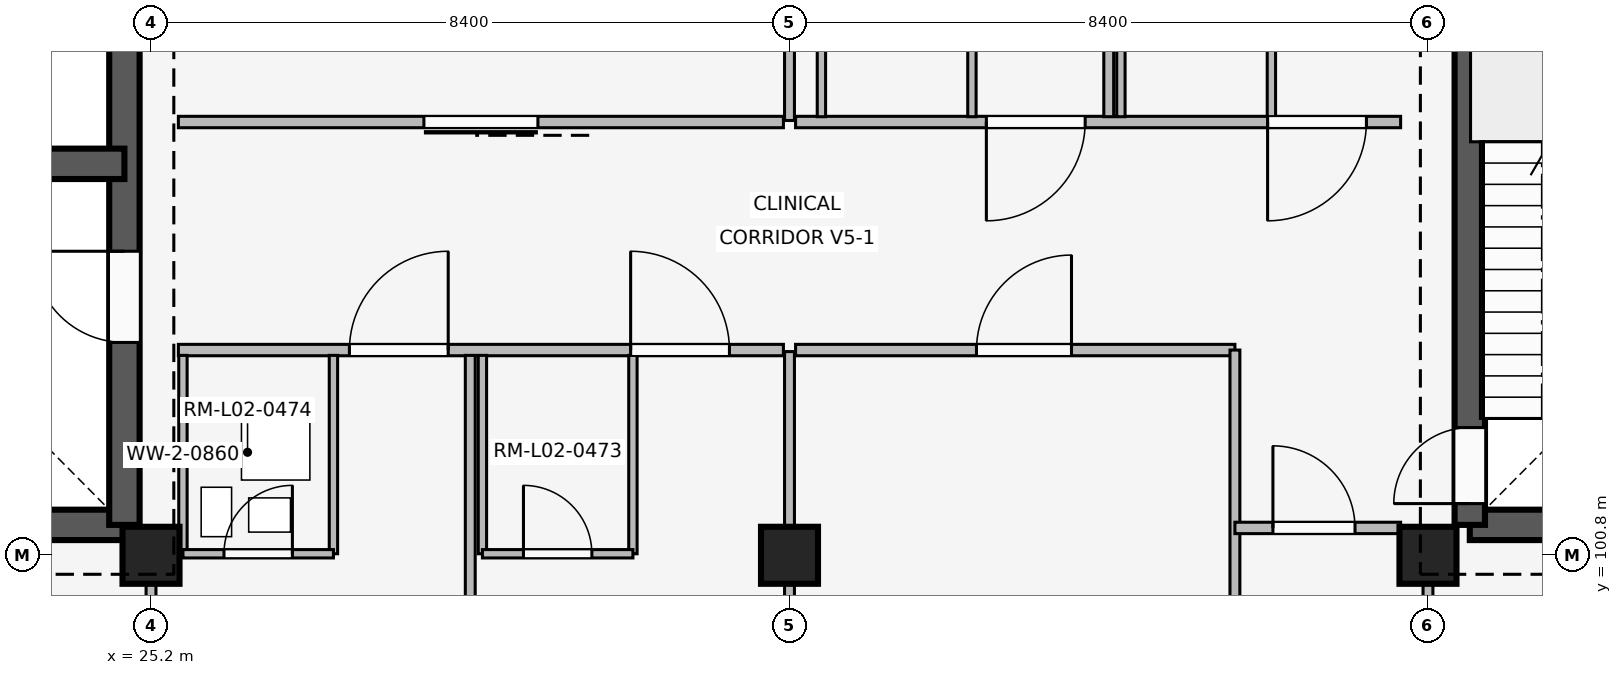
"""IFC4 building model, lengths in metres.
Left out: names, types, materials, properties, quantities, classifications, styles, units other than length and angle.
Written with IfcOpenShell. Run it as: python <this file> out.ifc"""

import sys

from ifc_helpers import new_model, si_unit, direction, frame, frame_2d, origin, origin_2d, place, context, subcontext, project, spatial, rectangle, extrude, element, fill, save


model = new_model("IFC4")
c1 = context("Model", 3, precision=1e-05, world=origin(), true_north=direction((0.0, 1.0)))
c2 = subcontext(c1, "Body", "Model", "MODEL_VIEW")
j1 = project(units=[si_unit("LENGTHUNIT", "METRE"), si_unit("PLANEANGLEUNIT", "RADIAN")], contexts=[c1])
p1 = place(None, origin())
s1 = spatial("IfcSite", under=j1, at=p1, CompositionType="ELEMENT")
p2 = place(p1, origin())
s2 = spatial("IfcBuilding", under=s1, at=p2, CompositionType="ELEMENT")
p3 = place(p2, frame((0.0, 0.0, 8.1)))
s3 = spatial("IfcBuildingStorey", under=s2, at=p3, CompositionType="ELEMENT", Elevation=8.1)
for number, where, z_axis, x_axis in (
    (1, (25.2, 100.8, 0.0), (0.0, 0.0, 1.0), (1.0, 0.0, 0.0)),
    (2, (33.6, 100.8, 0.0), (0.0, 0.0, 1.0), (1.0, 0.0, 0.0)),
    (3, (42.0, 100.8, 0.0), (0.0, 0.0, 1.0), (1.0, 0.0, 0.0)),
):
    element("IfcColumn", number, at=place(p3, frame(where, z_axis=z_axis, x_axis=x_axis)), inside=s3, PredefinedType="COLUMN", context=c2, shape_type="SweptSolid", body=[
        extrude(rectangle(XDim=0.75, YDim=0.75, at=origin_2d()), origin(), (0.0, 0.0, 1.0), 4.8),
    ])
p4 = place(p3, frame((42.55, 101.2, 0.0), z_axis=(0.0, 0.0, 1.0), x_axis=(1.0, 0.0, 0.0)))
e4 = element("IfcWall", 4, at=p4, inside=s3, PredefinedType="SHEAR", context=c2, shape_type="SweptSolid", body=[
    extrude(rectangle(XDim=7.5, YDim=0.4, at=frame_2d((3.75, 0.0))), origin(), (0.0, 0.0, 1.0), 4.52),
])
p5 = place(p4, frame((4.85, 0.0, 0.0)))
e5 = element("IfcOpeningElement", 5, at=p5, cuts=e4, PredefinedType="OPENING", context=c2, shape_type="SweptSolid", body=[
    extrude(rectangle(XDim=1.2, YDim=2.2, at=frame_2d((0.6, 1.1))), frame((0.0, 0.21, 0.0), z_axis=(0.0, -1.0, 0.0), x_axis=(1.0, 0.0, 0.0)), (0.0, 0.0, 1.0), 0.42),
])
p6 = place(p3, frame((42.55, 101.2, 0.0), z_axis=(0.0, 0.0, 1.0), x_axis=(0.0, 1.0, 0.0)))
e6 = element("IfcWall", 6, at=p6, inside=s3, PredefinedType="SHEAR", context=c2, shape_type="SweptSolid", body=[
    extrude(rectangle(XDim=7.55, YDim=0.4, at=frame_2d((3.775, 0.0))), origin(), (0.0, 0.0, 1.0), 4.52),
])
p7 = place(p6, frame((0.28, 0.0, 0.0)))
e7 = element("IfcOpeningElement", 7, at=p7, cuts=e6, PredefinedType="OPENING", context=c2, shape_type="SweptSolid", body=[
    extrude(rectangle(XDim=1.0, YDim=2.15, at=frame_2d((0.5, 1.075))), frame((0.0, 0.21, 0.0), z_axis=(0.0, -1.0, 0.0), x_axis=(1.0, 0.0, 0.0)), (0.0, 0.0, 1.0), 0.42),
])
p8 = place(p3, frame((17.35, 101.2, 0.0), z_axis=(0.0, 0.0, 1.0), x_axis=(1.0, 0.0, 0.0)))
e8 = element("IfcWall", 8, at=p8, inside=s3, PredefinedType="SHEAR", context=c2, shape_type="SweptSolid", body=[
    extrude(rectangle(XDim=7.5, YDim=0.4, at=frame_2d((3.75, 0.0))), origin(), (0.0, 0.0, 1.0), 4.52),
])
p9 = place(p8, frame((4.85, 0.0, 0.0)))
e9 = element("IfcOpeningElement", 9, at=p9, cuts=e8, PredefinedType="OPENING", context=c2, shape_type="SweptSolid", body=[
    extrude(rectangle(XDim=1.2, YDim=2.2, at=frame_2d((0.6, 1.1))), frame((0.0, 0.21, 0.0), z_axis=(0.0, -1.0, 0.0), x_axis=(1.0, 0.0, 0.0)), (0.0, 0.0, 1.0), 0.42),
])
p10 = place(p3, frame((24.85, 101.2, 0.0), z_axis=(0.0, 0.0, 1.0), x_axis=(0.0, 1.0, 0.0)))
e10 = element("IfcWall", 10, at=p10, inside=s3, PredefinedType="SHEAR", context=c2, shape_type="SweptSolid", body=[
    extrude(rectangle(XDim=7.55, YDim=0.4, at=frame_2d((3.775, 0.0))), origin(), (0.0, 0.0, 1.0), 4.52),
])
p11 = place(p10, frame((2.4, 0.0, 0.0)))
e11 = element("IfcOpeningElement", 11, at=p11, cuts=e10, PredefinedType="OPENING", context=c2, shape_type="SweptSolid", body=[
    extrude(rectangle(XDim=1.2, YDim=2.2, at=frame_2d((0.6, 1.1))), frame((0.0, 0.21, 0.0), z_axis=(0.0, -1.0, 0.0), x_axis=(1.0, 0.0, 0.0)), (0.0, 0.0, 1.0), 0.42),
])
p12 = place(p3, frame((21.05, 105.95, 0.0), z_axis=(0.0, 0.0, 1.0), x_axis=(1.0, 0.0, 0.0)))
e12 = element("IfcWall", 12, at=p12, inside=s3, PredefinedType="SHEAR", context=c2, shape_type="SweptSolid", body=[
    extrude(rectangle(XDim=3.8, YDim=0.4, at=frame_2d((1.9, 0.0))), origin(), (0.0, 0.0, 1.0), 4.52),
])
p13 = place(p12, frame((0.32, 0.0, 0.0)))
e13 = element("IfcOpeningElement", 13, at=p13, cuts=e12, PredefinedType="OPENING", context=c2, shape_type="SweptSolid", body=[
    extrude(rectangle(XDim=1.1, YDim=2.15, at=frame_2d((0.55, 1.075))), frame((0.0, 0.21, 0.0), z_axis=(0.0, -1.0, 0.0), x_axis=(1.0, 0.0, 0.0)), (0.0, 0.0, 1.0), 0.42),
])
p14 = place(p3, frame((25.2, 92.54, 0.0), z_axis=(0.0, 0.0, 1.0), x_axis=(0.0, 1.0, 0.0)))
e14 = element("IfcWall", 14, at=p14, inside=s3, PredefinedType="PARTITIONING", context=c2, shape_type="SweptSolid", body=[
    extrude(rectangle(XDim=8.21, YDim=0.13, at=frame_2d((4.105, 0.0))), origin(), (0.0, 0.0, 1.0), 3.84),
])
p15 = place(p14, frame((3.64, 0.0, 0.0)))
e15 = element("IfcOpeningElement", 15, at=p15, cuts=e14, PredefinedType="OPENING", context=c2, shape_type="SweptSolid", body=[
    extrude(rectangle(XDim=1.08, YDim=2.15, at=frame_2d((0.54, 1.075))), frame((0.0, 0.075, 0.0), z_axis=(0.0, -1.0, 0.0), x_axis=(1.0, 0.0, 0.0)), (0.0, 0.0, 1.0), 0.15),
])
p16 = place(p3, frame((25.56, 103.5, 0.0), z_axis=(0.0, 0.0, 1.0), x_axis=(1.0, 0.0, 0.0)))
e16 = element("IfcWall", 16, at=p16, inside=s3, PredefinedType="PARTITIONING", context=c2, shape_type="SweptSolid", body=[
    extrude(rectangle(XDim=7.96, YDim=0.15, at=frame_2d((3.98, 0.0))), origin(), (0.0, 0.0, 1.0), 3.84),
])
p17 = place(p16, frame((2.25, 0.0, 0.0)))
e17 = element("IfcOpeningElement", 17, at=p17, cuts=e16, PredefinedType="OPENING", context=c2, shape_type="SweptSolid", body=[
    extrude(rectangle(XDim=1.3, YDim=2.25, at=frame_2d((0.65, 1.125))), frame((0.0, 0.085, 0.0), z_axis=(0.0, -1.0, 0.0), x_axis=(1.0, 0.0, 0.0)), (0.0, 0.0, 1.0), 0.17),
])
p18 = place(p16, frame((5.95, 0.0, 0.0)))
e18 = element("IfcOpeningElement", 18, at=p18, cuts=e16, PredefinedType="OPENING", context=c2, shape_type="SweptSolid", body=[
    extrude(rectangle(XDim=1.3, YDim=2.25, at=frame_2d((0.65, 1.125))), frame((0.0, 0.085, 0.0), z_axis=(0.0, -1.0, 0.0), x_axis=(1.0, 0.0, 0.0)), (0.0, 0.0, 1.0), 0.17),
])
p19 = place(p3, frame((29.4, 92.5, 0.0), z_axis=(0.0, 0.0, 1.0), x_axis=(0.0, 1.0, 0.0)))
e19 = element("IfcWall", 19, at=p19, inside=s3, PredefinedType="PARTITIONING", context=c2, shape_type="SweptSolid", body=[
    extrude(rectangle(XDim=10.93, YDim=0.13, at=frame_2d((5.465, 0.0))), origin(), (0.0, 0.0, 1.0), 3.84),
])
for number, where, z_axis, x_axis in (
    (20, (25.62, 100.82, 0.0), (0.0, 0.0, 1.0), (0.0, 1.0, 0.0)),
    (21, (27.6, 100.82, 0.0), (0.0, 0.0, 1.0), (0.0, 1.0, 0.0)),
):
    element("IfcWall", number, at=place(p3, frame(where, z_axis=z_axis, x_axis=x_axis)), inside=s3, PredefinedType="PARTITIONING", context=c2, shape_type="SweptSolid", body=[
        extrude(rectangle(XDim=2.61, YDim=0.11, at=frame_2d((1.305, 0.0))), origin(), (0.0, 0.0, 1.0), 3.84),
    ])
p20 = place(p3, frame((25.62, 100.82, 0.0), z_axis=(0.0, 0.0, 1.0), x_axis=(1.0, 0.0, 0.0)))
e22 = element("IfcWall", 22, at=p20, inside=s3, PredefinedType="PARTITIONING", context=c2, shape_type="SweptSolid", body=[
    extrude(rectangle(XDim=1.98, YDim=0.11, at=frame_2d((0.99, 0.0))), origin(), (0.0, 0.0, 1.0), 3.84),
])
p21 = place(p20, frame((0.54, 0.0, 0.0)))
e23 = element("IfcOpeningElement", 23, at=p21, cuts=e22, PredefinedType="OPENING", context=c2, shape_type="SweptSolid", body=[
    extrude(rectangle(XDim=0.9, YDim=2.1, at=frame_2d((0.45, 1.05))), frame((0.0, 0.065, 0.0), z_axis=(0.0, -1.0, 0.0), x_axis=(1.0, 0.0, 0.0)), (0.0, 0.0, 1.0), 0.13),
])
for number, where, z_axis, x_axis in (
    (24, (29.56, 100.82, 0.0), (0.0, 0.0, 1.0), (0.0, 1.0, 0.0)),
    (25, (31.54, 100.82, 0.0), (0.0, 0.0, 1.0), (0.0, 1.0, 0.0)),
):
    element("IfcWall", number, at=place(p3, frame(where, z_axis=z_axis, x_axis=x_axis)), inside=s3, PredefinedType="PARTITIONING", context=c2, shape_type="SweptSolid", body=[
        extrude(rectangle(XDim=2.61, YDim=0.11, at=frame_2d((1.305, 0.0))), origin(), (0.0, 0.0, 1.0), 3.84),
    ])
p22 = place(p3, frame((29.56, 100.82, 0.0), z_axis=(0.0, 0.0, 1.0), x_axis=(1.0, 0.0, 0.0)))
e26 = element("IfcWall", 26, at=p22, inside=s3, PredefinedType="PARTITIONING", context=c2, shape_type="SweptSolid", body=[
    extrude(rectangle(XDim=1.98, YDim=0.11, at=frame_2d((0.99, 0.0))), origin(), (0.0, 0.0, 1.0), 3.84),
])
p23 = place(p22, frame((0.54, 0.0, 0.0)))
e27 = element("IfcOpeningElement", 27, at=p23, cuts=e26, PredefinedType="OPENING", context=c2, shape_type="SweptSolid", body=[
    extrude(rectangle(XDim=0.9, YDim=2.1, at=frame_2d((0.45, 1.05))), frame((0.0, 0.065, 0.0), z_axis=(0.0, -1.0, 0.0), x_axis=(1.0, 0.0, 0.0)), (0.0, 0.0, 1.0), 0.13),
])
p24 = place(p3, frame((33.52, 106.5, 0.0), z_axis=(0.0, 0.0, 1.0), x_axis=(-1.0, 0.0, 0.0)))
e28 = element("IfcWall", 28, at=p24, inside=s3, PredefinedType="PARTITIONING", context=c2, shape_type="SweptSolid", body=[
    extrude(rectangle(XDim=7.96, YDim=0.15, at=frame_2d((3.98, 0.0))), origin(), (0.0, 0.0, 1.0), 3.84),
])
p25 = place(p24, frame((3.23, 0.0, 0.0)))
e29 = element("IfcOpeningElement", 29, at=p25, cuts=e28, PredefinedType="OPENING", context=c2, shape_type="SweptSolid", body=[
    extrude(rectangle(XDim=1.5, YDim=2.3, at=frame_2d((0.75, 1.15))), frame((0.0, 0.085, 0.0), z_axis=(0.0, -1.0, 0.0), x_axis=(1.0, 0.0, 0.0)), (0.0, 0.0, 1.0), 0.17),
])
for number, where, z_axis, x_axis in (
    (30, (33.6, 92.54, 0.0), (0.0, 0.0, 1.0), (0.0, 1.0, 0.0)),
    (31, (33.6, 106.52, 0.0), (0.0, 0.0, 1.0), (0.0, 1.0, 0.0)),
):
    element("IfcWall", number, at=place(p3, frame(where, z_axis=z_axis, x_axis=x_axis)), inside=s3, PredefinedType="PARTITIONING", context=c2, shape_type="SweptSolid", body=[
        extrude(rectangle(XDim=10.94, YDim=0.13, at=frame_2d((5.47, 0.0))), origin(), (0.0, 0.0, 1.0), 3.84),
    ])
p26 = place(p3, frame((33.68, 103.5, 0.0), z_axis=(0.0, 0.0, 1.0), x_axis=(1.0, 0.0, 0.0)))
e32 = element("IfcWall", 32, at=p26, inside=s3, PredefinedType="PARTITIONING", context=c2, shape_type="SweptSolid", body=[
    extrude(rectangle(XDim=5.78, YDim=0.15, at=frame_2d((2.89, 0.0))), origin(), (0.0, 0.0, 1.0), 3.84),
])
p27 = place(p26, frame((2.38, 0.0, 0.0)))
e33 = element("IfcOpeningElement", 33, at=p27, cuts=e32, PredefinedType="OPENING", context=c2, shape_type="SweptSolid", body=[
    extrude(rectangle(XDim=1.25, YDim=2.2, at=frame_2d((0.625, 1.1))), frame((0.0, 0.085, 0.0), z_axis=(0.0, -1.0, 0.0), x_axis=(1.0, 0.0, 0.0)), (0.0, 0.0, 1.0), 0.17),
])
p28 = place(p3, frame((39.46, 92.56, 0.0), z_axis=(0.0, 0.0, 1.0), x_axis=(0.0, 1.0, 0.0)))
e34 = element("IfcWall", 34, at=p28, inside=s3, PredefinedType="PARTITIONING", context=c2, shape_type="SweptSolid", body=[
    extrude(rectangle(XDim=10.94, YDim=0.13, at=frame_2d((5.47, 0.0))), origin(), (0.0, 0.0, 1.0), 3.84),
])
p29 = place(p3, frame((39.46, 101.16, 0.0), z_axis=(0.0, 0.0, 1.0), x_axis=(1.0, 0.0, 0.0)))
e35 = element("IfcWall", 35, at=p29, inside=s3, PredefinedType="PARTITIONING", context=c2, shape_type="SweptSolid", body=[
    extrude(rectangle(XDim=2.18, YDim=0.15, at=frame_2d((1.09, 0.0))), origin(), (0.0, 0.0, 1.0), 3.84),
])
p30 = place(p29, frame((0.5, 0.0, 0.0)))
e36 = element("IfcOpeningElement", 36, at=p30, cuts=e35, PredefinedType="OPENING", context=c2, shape_type="SweptSolid", body=[
    extrude(rectangle(XDim=1.08, YDim=2.15, at=frame_2d((0.54, 1.075))), frame((0.0, 0.085, 0.0), z_axis=(0.0, -1.0, 0.0), x_axis=(1.0, 0.0, 0.0)), (0.0, 0.0, 1.0), 0.17),
])
p31 = place(p3, frame((41.64, 106.5, 0.0), z_axis=(0.0, 0.0, 1.0), x_axis=(-1.0, 0.0, 0.0)))
e37 = element("IfcWall", 37, at=p31, inside=s3, PredefinedType="PARTITIONING", context=c2, shape_type="SweptSolid", body=[
    extrude(rectangle(XDim=7.96, YDim=0.15, at=frame_2d((3.98, 0.0))), origin(), (0.0, 0.0, 1.0), 3.84),
])
p32 = place(p31, frame((0.45, 0.0, 0.0)))
e38 = element("IfcOpeningElement", 38, at=p32, cuts=e37, PredefinedType="OPENING", context=c2, shape_type="SweptSolid", body=[
    extrude(rectangle(XDim=1.3, YDim=2.25, at=frame_2d((0.65, 1.125))), frame((0.0, 0.085, 0.0), z_axis=(0.0, -1.0, 0.0), x_axis=(1.0, 0.0, 0.0)), (0.0, 0.0, 1.0), 0.17),
])
p33 = place(p31, frame((4.15, 0.0, 0.0)))
e39 = element("IfcOpeningElement", 39, at=p33, cuts=e37, PredefinedType="OPENING", context=c2, shape_type="SweptSolid", body=[
    extrude(rectangle(XDim=1.3, YDim=2.25, at=frame_2d((0.65, 1.125))), frame((0.0, 0.085, 0.0), z_axis=(0.0, -1.0, 0.0), x_axis=(1.0, 0.0, 0.0)), (0.0, 0.0, 1.0), 0.17),
])
p34 = place(p3, frame((37.8, 106.57, 0.0), z_axis=(0.0, 0.0, 1.0), x_axis=(0.0, 1.0, 0.0)))
e40 = element("IfcWall", 40, at=p34, inside=s3, PredefinedType="PARTITIONING", context=c2, shape_type="SweptSolid", body=[
    extrude(rectangle(XDim=10.93, YDim=0.13, at=frame_2d((5.465, 0.0))), origin(), (0.0, 0.0, 1.0), 3.84),
])
for number, where, z_axis, x_axis in (
    (41, (34.02, 106.57, 0.0), (0.0, 0.0, 1.0), (0.0, 1.0, 0.0)),
    (42, (36.0, 106.57, 0.0), (0.0, 0.0, 1.0), (0.0, 1.0, 0.0)),
    (43, (37.96, 106.57, 0.0), (0.0, 0.0, 1.0), (0.0, 1.0, 0.0)),
    (44, (39.94, 106.57, 0.0), (0.0, 0.0, 1.0), (0.0, 1.0, 0.0)),
):
    element("IfcWall", number, at=place(p3, frame(where, z_axis=z_axis, x_axis=x_axis)), inside=s3, PredefinedType="PARTITIONING", context=c2, shape_type="SweptSolid", body=[
        extrude(rectangle(XDim=2.61, YDim=0.11, at=frame_2d((1.305, 0.0))), origin(), (0.0, 0.0, 1.0), 3.84),
    ])
p35 = place(p3, frame((42.0, 92.54, 0.0), z_axis=(0.0, 0.0, 1.0), x_axis=(0.0, 1.0, 0.0)))
e45 = element("IfcWall", 45, at=p35, inside=s3, PredefinedType="PARTITIONING", context=c2, shape_type="SweptSolid", body=[
    extrude(rectangle(XDim=8.21, YDim=0.13, at=frame_2d((4.105, 0.0))), origin(), (0.0, 0.0, 1.0), 3.84),
])
p36 = place(p35, frame((3.64, 0.0, 0.0)))
e46 = element("IfcOpeningElement", 46, at=p36, cuts=e45, PredefinedType="OPENING", context=c2, shape_type="SweptSolid", body=[
    extrude(rectangle(XDim=1.08, YDim=2.15, at=frame_2d((0.54, 1.075))), frame((0.0, 0.075, 0.0), z_axis=(0.0, -1.0, 0.0), x_axis=(1.0, 0.0, 0.0)), (0.0, 0.0, 1.0), 0.15),
])
p37 = place(p7, origin())
e47 = element("IfcDoor", 47, at=p37, inside=s3, OperationType="SINGLE_SWING_LEFT", PredefinedType="DOOR", context=c2, shape_type="SweptSolid", body=[
    extrude(rectangle(XDim=1.0, YDim=2.15, at=frame_2d((0.5, 1.075))), frame((0.0, 0.025, 0.0), z_axis=(0.0, -1.0, 0.0), x_axis=(1.0, 0.0, 0.0)), (0.0, 0.0, 1.0), 0.05),
])
fill(e7, e47)
p38 = place(p11, origin())
e48 = element("IfcDoor", 48, at=p38, inside=s3, OperationType="SINGLE_SWING_RIGHT", PredefinedType="DOOR", context=c2, shape_type="SweptSolid", body=[
    extrude(rectangle(XDim=1.2, YDim=2.2, at=frame_2d((0.6, 1.1))), frame((0.0, 0.025, 0.0), z_axis=(0.0, -1.0, 0.0), x_axis=(1.0, 0.0, 0.0)), (0.0, 0.0, 1.0), 0.05),
])
fill(e11, e48)
p39 = place(p17, origin())
e49 = element("IfcDoor", 49, at=p39, inside=s3, OperationType="SINGLE_SWING_RIGHT", PredefinedType="DOOR", context=c2, shape_type="SweptSolid", body=[
    extrude(rectangle(XDim=1.3, YDim=2.25, at=frame_2d((0.65, 1.125))), frame((0.0, 0.025, 0.0), z_axis=(0.0, -1.0, 0.0), x_axis=(1.0, 0.0, 0.0)), (0.0, 0.0, 1.0), 0.05),
])
fill(e17, e49)
p40 = place(p18, origin())
e50 = element("IfcDoor", 50, at=p40, inside=s3, OperationType="SINGLE_SWING_LEFT", PredefinedType="DOOR", context=c2, shape_type="SweptSolid", body=[
    extrude(rectangle(XDim=1.3, YDim=2.25, at=frame_2d((0.65, 1.125))), frame((0.0, 0.025, 0.0), z_axis=(0.0, -1.0, 0.0), x_axis=(1.0, 0.0, 0.0)), (0.0, 0.0, 1.0), 0.05),
])
fill(e18, e50)
p41 = place(p21, origin())
e51 = element("IfcDoor", 51, at=p41, inside=s3, OperationType="SINGLE_SWING_RIGHT", PredefinedType="DOOR", context=c2, shape_type="SweptSolid", body=[
    extrude(rectangle(XDim=0.9, YDim=2.1, at=frame_2d((0.45, 1.05))), frame((0.0, 0.025, 0.0), z_axis=(0.0, -1.0, 0.0), x_axis=(1.0, 0.0, 0.0)), (0.0, 0.0, 1.0), 0.05),
])
fill(e23, e51)
p42 = place(p23, origin())
e52 = element("IfcDoor", 52, at=p42, inside=s3, OperationType="SINGLE_SWING_LEFT", PredefinedType="DOOR", context=c2, shape_type="SweptSolid", body=[
    extrude(rectangle(XDim=0.9, YDim=2.1, at=frame_2d((0.45, 1.05))), frame((0.0, 0.025, 0.0), z_axis=(0.0, -1.0, 0.0), x_axis=(1.0, 0.0, 0.0)), (0.0, 0.0, 1.0), 0.05),
])
fill(e27, e52)
p43 = place(p25, origin())
e53 = element("IfcDoor", 53, at=p43, inside=s3, OperationType="SLIDING_TO_LEFT", PredefinedType="DOOR", context=c2, shape_type="SweptSolid", body=[
    extrude(rectangle(XDim=1.5, YDim=2.3, at=frame_2d((0.75, 1.15))), frame((0.0, 0.025, 0.0), z_axis=(0.0, -1.0, 0.0), x_axis=(1.0, 0.0, 0.0)), (0.0, 0.0, 1.0), 0.05),
])
fill(e29, e53)
p44 = place(p27, origin())
e54 = element("IfcDoor", 54, at=p44, inside=s3, OperationType="SINGLE_SWING_RIGHT", PredefinedType="DOOR", context=c2, shape_type="SweptSolid", body=[
    extrude(rectangle(XDim=1.25, YDim=2.2, at=frame_2d((0.625, 1.1))), frame((0.0, 0.025, 0.0), z_axis=(0.0, -1.0, 0.0), x_axis=(1.0, 0.0, 0.0)), (0.0, 0.0, 1.0), 0.05),
])
fill(e33, e54)
p45 = place(p30, origin())
e55 = element("IfcDoor", 55, at=p45, inside=s3, OperationType="SINGLE_SWING_LEFT", PredefinedType="DOOR", context=c2, shape_type="SweptSolid", body=[
    extrude(rectangle(XDim=1.08, YDim=2.15, at=frame_2d((0.54, 1.075))), frame((0.0, 0.025, 0.0), z_axis=(0.0, -1.0, 0.0), x_axis=(1.0, 0.0, 0.0)), (0.0, 0.0, 1.0), 0.05),
])
fill(e36, e55)
p46 = place(p32, origin())
e56 = element("IfcDoor", 56, at=p46, inside=s3, OperationType="SINGLE_SWING_RIGHT", PredefinedType="DOOR", context=c2, shape_type="SweptSolid", body=[
    extrude(rectangle(XDim=1.3, YDim=2.25, at=frame_2d((0.65, 1.125))), frame((0.0, 0.025, 0.0), z_axis=(0.0, -1.0, 0.0), x_axis=(1.0, 0.0, 0.0)), (0.0, 0.0, 1.0), 0.05),
])
fill(e38, e56)
p47 = place(p33, origin())
e57 = element("IfcDoor", 57, at=p47, inside=s3, OperationType="SINGLE_SWING_RIGHT", PredefinedType="DOOR", context=c2, shape_type="SweptSolid", body=[
    extrude(rectangle(XDim=1.3, YDim=2.25, at=frame_2d((0.65, 1.125))), frame((0.0, 0.025, 0.0), z_axis=(0.0, -1.0, 0.0), x_axis=(1.0, 0.0, 0.0)), (0.0, 0.0, 1.0), 0.05),
])
fill(e39, e57)
save(model, sys.argv[1])
